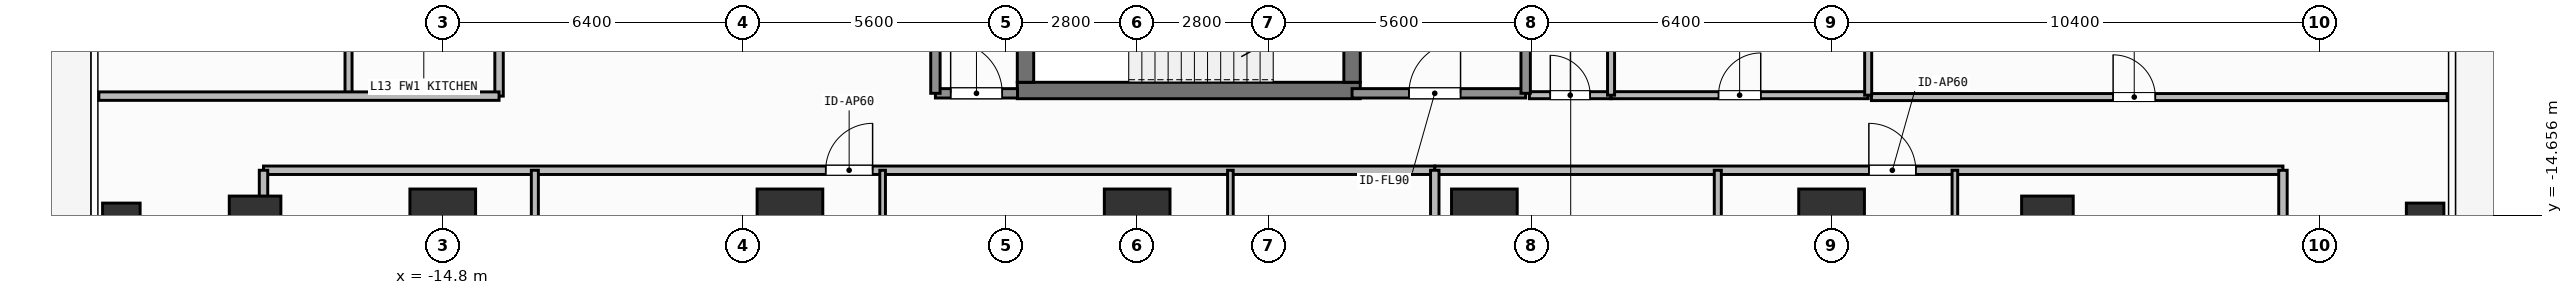
"""IFC4 building model, lengths in metres.
Left out: names, types, materials, properties, quantities, classifications, styles, units other than length and angle.
Written with IfcOpenShell. Run it as: python <this file> out.ifc"""

import sys

from ifc_helpers import new_model, si_unit, direction, frame, frame_2d, origin, origin_2d, place, context, subcontext, project, spatial, rectangle, hollow_rectangle, extrude, element, fill, save


model = new_model("IFC4")
c1 = context("Model", 3, precision=1e-05, world=origin(), true_north=direction((0.0, 1.0)))
c2 = subcontext(c1, "Body", "Model", "MODEL_VIEW")
j1 = project(units=[si_unit("LENGTHUNIT", "METRE"), si_unit("PLANEANGLEUNIT", "RADIAN")], contexts=[c1])
p1 = place(None, origin())
s1 = spatial("IfcSite", under=j1, at=p1, CompositionType="ELEMENT")
p2 = place(p1, origin())
s2 = spatial("IfcBuilding", under=s1, at=p2, CompositionType="ELEMENT")
p3 = place(p2, frame((0.0, 0.0, 50.1)))
s3 = spatial("IfcBuildingStorey", under=s2, at=p3, CompositionType="ELEMENT", Elevation=50.1)
p4 = place(p3, frame((-2.555, -12.0, 0.0), z_axis=(0.0, 0.0, 1.0), x_axis=(1.0, 0.0, 0.0)))
e1 = element("IfcWall", 1, at=p4, inside=s3, PredefinedType="SHEAR", context=c2, shape_type="SweptSolid", body=[
    extrude(rectangle(XDim=7.31, YDim=0.35, at=frame_2d((3.655, 0.0))), origin(), (0.0, 0.0, 1.0), 3.9),
])
p5 = place(p3, frame((-2.38, -11.825, 0.0), z_axis=(0.0, 0.0, 1.0), x_axis=(0.0, 1.0, 0.0)))
e2 = element("IfcWall", 2, at=p5, inside=s3, PredefinedType="SHEAR", context=c2, shape_type="SweptSolid", body=[
    extrude(rectangle(XDim=2.925, YDim=0.35, at=frame_2d((1.462, 0.0))), origin(), (0.0, 0.0, 1.0), 3.9),
])
p6 = place(p3, frame((4.58, -8.9, 0.0), z_axis=(0.0, 0.0, 1.0), x_axis=(0.0, -1.0, 0.0)))
e3 = element("IfcWall", 3, at=p6, inside=s3, PredefinedType="SHEAR", context=c2, shape_type="SweptSolid", body=[
    extrude(rectangle(XDim=2.925, YDim=0.35, at=frame_2d((1.462, 0.0))), origin(), (0.0, 0.0, 1.0), 3.9),
])
p7 = place(p6, frame((0.913, 0.0, 0.0)))
e4 = element("IfcOpeningElement", 4, at=p7, cuts=e3, PredefinedType="OPENING", context=c2, shape_type="SweptSolid", body=[
    extrude(rectangle(XDim=1.1, YDim=2.15, at=frame_2d((0.55, 1.075))), frame((0.0, 0.185, 0.0), z_axis=(0.0, -1.0, 0.0), x_axis=(1.0, 0.0, 0.0)), (0.0, 0.0, 1.0), 0.37),
])
for number, where, z_axis, x_axis in (
    (5, (-14.8, -14.8, 0.0), (0.0, 0.0, 1.0), (1.0, 0.0, 0.0)),
    (6, (-7.4, -14.8, 0.0), (0.0, 0.0, 1.0), (1.0, 0.0, 0.0)),
    (7, (0.0, -14.8, 0.0), (0.0, 0.0, 1.0), (1.0, 0.0, 0.0)),
    (8, (7.4, -14.8, 0.0), (0.0, 0.0, 1.0), (1.0, 0.0, 0.0)),
    (9, (14.8, -14.8, 0.0), (0.0, 0.0, 1.0), (1.0, 0.0, 0.0)),
):
    element("IfcColumn", number, at=place(p3, frame(where, z_axis=z_axis, x_axis=x_axis)), inside=s3, PredefinedType="COLUMN", context=c2, shape_type="SweptSolid", body=[
        extrude(rectangle(XDim=1.4, YDim=1.4, at=origin_2d()), origin(), (0.0, 0.0, 1.0), 3.9),
    ])
for number, where, z_axis, x_axis in (
    (10, (-18.8, -14.8, 0.0), (0.0, 0.0, 1.0), (1.0, 0.0, 0.0)),
    (11, (19.4, -14.8, 0.0), (0.0, 0.0, 1.0), (1.0, 0.0, 0.0)),
):
    element("IfcColumn", number, at=place(p3, frame(where, z_axis=z_axis, x_axis=x_axis)), inside=s3, PredefinedType="COLUMN", context=c2, shape_type="SweptSolid", body=[
        extrude(rectangle(XDim=1.1, YDim=1.1, at=origin_2d()), origin(), (0.0, 0.0, 1.0), 3.9),
    ])
for number, where, z_axis, x_axis in (
    (12, (-21.65, -14.8, 0.0), (0.0, 0.0, 1.0), (1.0, 0.0, 0.0)),
    (13, (27.45, -14.8, 0.0), (0.0, 0.0, 1.0), (1.0, 0.0, 0.0)),
):
    element("IfcColumn", number, at=place(p3, frame(where, z_axis=z_axis, x_axis=x_axis)), inside=s3, PredefinedType="COLUMN", context=c2, shape_type="SweptSolid", body=[
        extrude(hollow_rectangle(XDim=0.8, YDim=0.8, WallThickness=0.036, at=origin_2d()), origin(), (0.0, 0.0, 1.0), 3.9),
    ])
p8 = place(p3, frame((4.58, -12.06, 0.0), z_axis=(0.0, 0.0, 1.0), x_axis=(1.0, 0.0, 0.0)))
e14 = element("IfcWall", 14, at=p8, inside=s3, PredefinedType="SOLIDWALL", context=c2, shape_type="SweptSolid", body=[
    extrude(rectangle(XDim=3.7, YDim=0.2, at=frame_2d((1.85, 0.0))), origin(), (0.0, 0.0, 1.0), 3.62),
])
p9 = place(p8, frame((1.212, 0.0, 0.0)))
e15 = element("IfcOpeningElement", 15, at=p9, cuts=e14, PredefinedType="OPENING", context=c2, shape_type="SweptSolid", body=[
    extrude(rectangle(XDim=1.1, YDim=2.15, at=frame_2d((0.55, 1.075))), frame((0.0, 0.11, 0.0), z_axis=(0.0, -1.0, 0.0), x_axis=(1.0, 0.0, 0.0)), (0.0, 0.0, 1.0), 0.22),
])
p10 = place(p3, frame((-4.3, -12.06, 0.0), z_axis=(0.0, 0.0, 1.0), x_axis=(1.0, 0.0, 0.0)))
e16 = element("IfcWall", 16, at=p10, inside=s3, PredefinedType="SOLIDWALL", context=c2, shape_type="SweptSolid", body=[
    extrude(rectangle(XDim=1.75, YDim=0.2, at=frame_2d((0.875, 0.0))), origin(), (0.0, 0.0, 1.0), 3.62),
])
p11 = place(p10, frame((0.325, 0.0, 0.0)))
e17 = element("IfcOpeningElement", 17, at=p11, cuts=e16, PredefinedType="OPENING", context=c2, shape_type="SweptSolid", body=[
    extrude(rectangle(XDim=1.1, YDim=2.15, at=frame_2d((0.55, 1.075))), frame((0.0, 0.11, 0.0), z_axis=(0.0, -1.0, 0.0), x_axis=(1.0, 0.0, 0.0)), (0.0, 0.0, 1.0), 0.22),
])
p12 = place(p3, frame((8.36, -12.1, 0.0), z_axis=(0.0, 0.0, 1.0), x_axis=(1.0, 0.0, 0.0)))
e18 = element("IfcWall", 18, at=p12, inside=s3, PredefinedType="PARTITIONING", context=c2, shape_type="SweptSolid", body=[
    extrude(rectangle(XDim=1.74, YDim=0.15, at=frame_2d((0.87, 0.0))), origin(), (0.0, 0.0, 1.0), 3.62),
])
p13 = place(p12, frame((0.445, 0.0, 0.0)))
e19 = element("IfcOpeningElement", 19, at=p13, cuts=e18, PredefinedType="OPENING", context=c2, shape_type="SweptSolid", body=[
    extrude(rectangle(XDim=0.85, YDim=2.1, at=frame_2d((0.425, 1.05))), frame((0.0, 0.085, 0.0), z_axis=(0.0, -1.0, 0.0), x_axis=(1.0, 0.0, 0.0)), (0.0, 0.0, 1.0), 0.17),
])
p14 = place(p3, frame((10.1, -12.1, 0.0), z_axis=(0.0, 0.0, 1.0), x_axis=(1.0, 0.0, 0.0)))
e20 = element("IfcWall", 20, at=p14, inside=s3, PredefinedType="PARTITIONING", context=c2, shape_type="SweptSolid", body=[
    extrude(rectangle(XDim=5.48, YDim=0.15, at=frame_2d((2.74, 0.0))), origin(), (0.0, 0.0, 1.0), 3.62),
])
p15 = place(p14, frame((2.29, 0.0, 0.0)))
e21 = element("IfcOpeningElement", 21, at=p15, cuts=e20, PredefinedType="OPENING", context=c2, shape_type="SweptSolid", body=[
    extrude(rectangle(XDim=0.9, YDim=2.1, at=frame_2d((0.45, 1.05))), frame((0.0, 0.085, 0.0), z_axis=(0.0, -1.0, 0.0), x_axis=(1.0, 0.0, 0.0)), (0.0, 0.0, 1.0), 0.17),
])
p16 = place(p3, frame((-18.62, -13.7, 0.0), z_axis=(0.0, 0.0, 1.0), x_axis=(1.0, 0.0, 0.0)))
e22 = element("IfcWall", 22, at=p16, inside=s3, PredefinedType="PARTITIONING", context=c2, shape_type="SweptSolid", body=[
    extrude(rectangle(XDim=24.963, YDim=0.18, at=frame_2d((12.481, 0.0))), origin(), (0.0, 0.0, 1.0), 3.62),
])
p17 = place(p16, frame((11.981, 0.0, 0.0)))
e23 = element("IfcOpeningElement", 23, at=p17, cuts=e22, PredefinedType="OPENING", context=c2, shape_type="SweptSolid", body=[
    extrude(rectangle(XDim=1.0, YDim=2.2, at=frame_2d((0.5, 1.1))), frame((0.0, 0.1, 0.0), z_axis=(0.0, -1.0, 0.0), x_axis=(1.0, 0.0, 0.0)), (0.0, 0.0, 1.0), 0.2),
])
p18 = place(p3, frame((-5.425, -20.79, 0.0), z_axis=(0.0, 0.0, 1.0), x_axis=(0.0, 1.0, 0.0)))
e24 = element("IfcWall", 24, at=p18, inside=s3, PredefinedType="PARTITIONING", context=c2, shape_type="SweptSolid", body=[
    extrude(rectangle(XDim=7.09, YDim=0.12, at=frame_2d((3.545, 0.0))), origin(), (0.0, 0.0, 1.0), 3.62),
])
p19 = place(p18, frame((2.117, 0.0, 0.0)))
e25 = element("IfcOpeningElement", 25, at=p19, cuts=e24, PredefinedType="OPENING", context=c2, shape_type="SweptSolid", body=[
    extrude(rectangle(XDim=0.9, YDim=2.1, at=frame_2d((0.45, 1.05))), frame((0.0, 0.07, 0.0), z_axis=(0.0, -1.0, 0.0), x_axis=(1.0, 0.0, 0.0)), (0.0, 0.0, 1.0), 0.14),
])
p20 = place(p3, frame((-12.837, -20.79, 0.0), z_axis=(0.0, 0.0, 1.0), x_axis=(0.0, 1.0, 0.0)))
e26 = element("IfcWall", 26, at=p20, inside=s3, PredefinedType="PARTITIONING", context=c2, shape_type="SweptSolid", body=[
    extrude(rectangle(XDim=7.09, YDim=0.15, at=frame_2d((3.545, 0.0))), origin(), (0.0, 0.0, 1.0), 3.62),
])
p21 = place(p20, frame((2.133, 0.0, 0.0)))
e27 = element("IfcOpeningElement", 27, at=p21, cuts=e26, PredefinedType="OPENING", context=c2, shape_type="SweptSolid", body=[
    extrude(rectangle(XDim=0.85, YDim=2.1, at=frame_2d((0.425, 1.05))), frame((0.0, 0.085, 0.0), z_axis=(0.0, -1.0, 0.0), x_axis=(1.0, 0.0, 0.0)), (0.0, 0.0, 1.0), 0.17),
])
p22 = place(p3, frame((1.987, -18.663, 0.0), z_axis=(0.0, 0.0, 1.0), x_axis=(0.0, 1.0, 0.0)))
e28 = element("IfcWall", 28, at=p22, inside=s3, PredefinedType="PARTITIONING", context=c2, shape_type="SweptSolid", body=[
    extrude(rectangle(XDim=4.963, YDim=0.12, at=frame_2d((2.481, 0.0))), origin(), (0.0, 0.0, 1.0), 3.62),
])
p23 = place(p22, frame((2.056, 0.0, 0.0)))
e29 = element("IfcOpeningElement", 29, at=p23, cuts=e28, PredefinedType="OPENING", context=c2, shape_type="SweptSolid", body=[
    extrude(rectangle(XDim=0.85, YDim=2.1, at=frame_2d((0.425, 1.05))), frame((0.0, 0.07, 0.0), z_axis=(0.0, -1.0, 0.0), x_axis=(1.0, 0.0, 0.0)), (0.0, 0.0, 1.0), 0.14),
])
p24 = place(p3, frame((6.343, -13.7, 0.0), z_axis=(0.0, 0.0, 1.0), x_axis=(1.0, 0.0, 0.0)))
e30 = element("IfcWall", 30, at=p24, inside=s3, PredefinedType="PARTITIONING", context=c2, shape_type="SweptSolid", body=[
    extrude(rectangle(XDim=18.077, YDim=0.18, at=frame_2d((9.039, 0.0))), origin(), (0.0, 0.0, 1.0), 3.62),
])
p25 = place(p24, frame((9.252, 0.0, 0.0)))
e31 = element("IfcOpeningElement", 31, at=p25, cuts=e30, PredefinedType="OPENING", context=c2, shape_type="SweptSolid", body=[
    extrude(rectangle(XDim=1.0, YDim=2.2, at=frame_2d((0.5, 1.1))), frame((0.0, 0.1, 0.0), z_axis=(0.0, -1.0, 0.0), x_axis=(1.0, 0.0, 0.0)), (0.0, 0.0, 1.0), 0.2),
])
p26 = place(p3, frame((12.375, -20.79, 0.0), z_axis=(0.0, 0.0, 1.0), x_axis=(0.0, 1.0, 0.0)))
e32 = element("IfcWall", 32, at=p26, inside=s3, PredefinedType="PARTITIONING", context=c2, shape_type="SweptSolid", body=[
    extrude(rectangle(XDim=7.09, YDim=0.15, at=frame_2d((3.545, 0.0))), origin(), (0.0, 0.0, 1.0), 3.62),
])
p27 = place(p26, frame((3.03, 0.0, 0.0)))
e33 = element("IfcOpeningElement", 33, at=p27, cuts=e32, PredefinedType="OPENING", context=c2, shape_type="SweptSolid", body=[
    extrude(rectangle(XDim=0.85, YDim=2.1, at=frame_2d((0.425, 1.05))), frame((0.0, 0.085, 0.0), z_axis=(0.0, -1.0, 0.0), x_axis=(1.0, 0.0, 0.0)), (0.0, 0.0, 1.0), 0.17),
])
p28 = place(p3, frame((17.428, -17.883, 0.0), z_axis=(0.0, 0.0, 1.0), x_axis=(0.0, 1.0, 0.0)))
e34 = element("IfcWall", 34, at=p28, inside=s3, PredefinedType="PARTITIONING", context=c2, shape_type="SweptSolid", body=[
    extrude(rectangle(XDim=4.183, YDim=0.12, at=frame_2d((2.092, 0.0))), origin(), (0.0, 0.0, 1.0), 3.62),
])
p29 = place(p28, frame((1.578, 0.0, 0.0)))
e35 = element("IfcOpeningElement", 35, at=p29, cuts=e34, PredefinedType="OPENING", context=c2, shape_type="SweptSolid", body=[
    extrude(rectangle(XDim=0.85, YDim=2.1, at=frame_2d((0.425, 1.05))), frame((0.0, 0.07, 0.0), z_axis=(0.0, -1.0, 0.0), x_axis=(1.0, 0.0, 0.0)), (0.0, 0.0, 1.0), 0.14),
])
p30 = place(p3, frame((-13.6, -12.12, 0.0), z_axis=(0.0, 0.0, 1.0), x_axis=(0.0, 1.0, 0.0)))
e36 = element("IfcWall", 36, at=p30, inside=s3, PredefinedType="PARTITIONING", context=c2, shape_type="SweptSolid", body=[
    extrude(rectangle(XDim=24.24, YDim=0.18, at=frame_2d((12.12, 0.0))), origin(), (0.0, 0.0, 1.0), 3.62),
])
p31 = place(p30, frame((9.829, 0.0, 0.0)))
e37 = element("IfcOpeningElement", 37, at=p31, cuts=e36, PredefinedType="OPENING", context=c2, shape_type="SweptSolid", body=[
    extrude(rectangle(XDim=1.0, YDim=2.2, at=frame_2d((0.5, 1.1))), frame((0.0, 0.1, 0.0), z_axis=(0.0, -1.0, 0.0), x_axis=(1.0, 0.0, 0.0)), (0.0, 0.0, 1.0), 0.2),
])
p32 = place(p3, frame((15.65, -12.14, 0.0), z_axis=(0.0, 0.0, 1.0), x_axis=(1.0, 0.0, 0.0)))
e38 = element("IfcWall", 38, at=p32, inside=s3, PredefinedType="PARTITIONING", context=c2, shape_type="SweptSolid", body=[
    extrude(rectangle(XDim=12.27, YDim=0.15, at=frame_2d((6.135, 0.0))), origin(), (0.0, 0.0, 1.0), 3.62),
])
p33 = place(p32, frame((5.15, 0.0, 0.0)))
e39 = element("IfcOpeningElement", 39, at=p33, cuts=e38, PredefinedType="OPENING", context=c2, shape_type="SweptSolid", body=[
    extrude(rectangle(XDim=0.9, YDim=2.1, at=frame_2d((0.45, 1.05))), frame((0.0, 0.085, 0.0), z_axis=(0.0, -1.0, 0.0), x_axis=(1.0, 0.0, 0.0)), (0.0, 0.0, 1.0), 0.17),
])
for number, where, z_axis, x_axis in (
    (40, (8.28, -12.06, 0.0), (0.0, 0.0, 1.0), (0.0, 1.0, 0.0)),
    (41, (-4.3, -12.06, 0.0), (0.0, 0.0, 1.0), (0.0, 1.0, 0.0)),
):
    element("IfcWall", number, at=place(p3, frame(where, z_axis=z_axis, x_axis=x_axis)), inside=s3, PredefinedType="SOLIDWALL", context=c2, shape_type="SweptSolid", body=[
        extrude(rectangle(XDim=3.11, YDim=0.2, at=frame_2d((1.555, 0.0))), origin(), (0.0, 0.0, 1.0), 3.62),
    ])
p34 = place(p3, frame((10.1, -12.1, 0.0), z_axis=(0.0, 0.0, 1.0), x_axis=(0.0, 1.0, 0.0)))
e42 = element("IfcWall", 42, at=p34, inside=s3, PredefinedType="PARTITIONING", context=c2, shape_type="SweptSolid", body=[
    extrude(rectangle(XDim=2.35, YDim=0.15, at=frame_2d((1.175, 0.0))), origin(), (0.0, 0.0, 1.0), 3.62),
])
p35 = place(p3, frame((15.58, -12.1, 0.0), z_axis=(0.0, 0.0, 1.0), x_axis=(0.0, 1.0, 0.0)))
e43 = element("IfcWall", 43, at=p35, inside=s3, PredefinedType="PARTITIONING", context=c2, shape_type="SweptSolid", body=[
    extrude(rectangle(XDim=6.25, YDim=0.15, at=frame_2d((3.125, 0.0))), origin(), (0.0, 0.0, 1.0), 3.62),
])
p36 = place(p3, frame((-18.62, -23.91, 0.0), z_axis=(0.0, 0.0, 1.0), x_axis=(0.0, 1.0, 0.0)))
e44 = element("IfcWall", 44, at=p36, inside=s3, PredefinedType="PARTITIONING", context=c2, shape_type="SweptSolid", body=[
    extrude(rectangle(XDim=10.21, YDim=0.18, at=frame_2d((5.105, 0.0))), origin(), (0.0, 0.0, 1.0), 2.71),
])
p37 = place(p3, frame((24.42, -23.91, 0.0), z_axis=(0.0, 0.0, 1.0), x_axis=(0.0, 1.0, 0.0)))
e45 = element("IfcWall", 45, at=p37, inside=s3, PredefinedType="PARTITIONING", context=c2, shape_type="SweptSolid", body=[
    extrude(rectangle(XDim=10.21, YDim=0.18, at=frame_2d((5.105, 0.0))), origin(), (0.0, 0.0, 1.0), 3.62),
])
p38 = place(p3, frame((6.343, -25.03, 0.0), z_axis=(0.0, 0.0, 1.0), x_axis=(0.0, 1.0, 0.0)))
e46 = element("IfcWall", 46, at=p38, inside=s3, PredefinedType="PARTITIONING", context=c2, shape_type="SweptSolid", body=[
    extrude(rectangle(XDim=11.33, YDim=0.18, at=frame_2d((5.665, 0.0))), origin(), (0.0, 0.0, 1.0), 3.62),
])
p39 = place(p3, frame((-16.808, -12.12, 0.0), z_axis=(0.0, 0.0, 1.0), x_axis=(0.0, 1.0, 0.0)))
e47 = element("IfcWall", 47, at=p39, inside=s3, PredefinedType="PARTITIONING", context=c2, shape_type="SweptSolid", body=[
    extrude(rectangle(XDim=2.8, YDim=0.15, at=frame_2d((1.4, 0.0))), origin(), (0.0, 0.0, 1.0), 3.62),
])
p40 = place(p3, frame((-22.13, -12.12, 0.0), z_axis=(0.0, 0.0, 1.0), x_axis=(1.0, 0.0, 0.0)))
e48 = element("IfcWall", 48, at=p40, inside=s3, PredefinedType="PARTITIONING", context=c2, shape_type="SweptSolid", body=[
    extrude(rectangle(XDim=8.53, YDim=0.18, at=frame_2d((4.265, 0.0))), origin(), (0.0, 0.0, 1.0), 3.62),
])
p41 = place(p9, origin())
e49 = element("IfcDoor", 49, at=p41, inside=s3, OperationType="SINGLE_SWING_RIGHT", PredefinedType="DOOR", context=c2, shape_type="SweptSolid", body=[
    extrude(rectangle(XDim=1.1, YDim=2.15, at=frame_2d((0.55, 1.075))), frame((0.0, 0.025, 0.0), z_axis=(0.0, -1.0, 0.0), x_axis=(1.0, 0.0, 0.0)), (0.0, 0.0, 1.0), 0.05),
])
fill(e15, e49)
p42 = place(p11, origin())
e50 = element("IfcDoor", 50, at=p42, inside=s3, OperationType="SINGLE_SWING_LEFT", PredefinedType="DOOR", context=c2, shape_type="SweptSolid", body=[
    extrude(rectangle(XDim=1.1, YDim=2.15, at=frame_2d((0.55, 1.075))), frame((0.0, 0.025, 0.0), z_axis=(0.0, -1.0, 0.0), x_axis=(1.0, 0.0, 0.0)), (0.0, 0.0, 1.0), 0.05),
])
fill(e17, e50)
p43 = place(p13, origin())
e51 = element("IfcDoor", 51, at=p43, inside=s3, OperationType="SINGLE_SWING_LEFT", PredefinedType="DOOR", context=c2, shape_type="SweptSolid", body=[
    extrude(rectangle(XDim=0.85, YDim=2.1, at=frame_2d((0.425, 1.05))), frame((0.0, 0.025, 0.0), z_axis=(0.0, -1.0, 0.0), x_axis=(1.0, 0.0, 0.0)), (0.0, 0.0, 1.0), 0.05),
])
fill(e19, e51)
p44 = place(p15, origin())
e52 = element("IfcDoor", 52, at=p44, inside=s3, OperationType="SINGLE_SWING_RIGHT", PredefinedType="DOOR", context=c2, shape_type="SweptSolid", body=[
    extrude(rectangle(XDim=0.9, YDim=2.1, at=frame_2d((0.45, 1.05))), frame((0.0, 0.025, 0.0), z_axis=(0.0, -1.0, 0.0), x_axis=(1.0, 0.0, 0.0)), (0.0, 0.0, 1.0), 0.05),
])
fill(e21, e52)
p45 = place(p17, origin())
e53 = element("IfcDoor", 53, at=p45, inside=s3, OperationType="SINGLE_SWING_RIGHT", PredefinedType="DOOR", context=c2, shape_type="SweptSolid", body=[
    extrude(rectangle(XDim=1.0, YDim=2.2, at=frame_2d((0.5, 1.1))), frame((0.0, 0.025, 0.0), z_axis=(0.0, -1.0, 0.0), x_axis=(1.0, 0.0, 0.0)), (0.0, 0.0, 1.0), 0.05),
])
fill(e23, e53)
p46 = place(p25, origin())
e54 = element("IfcDoor", 54, at=p46, inside=s3, OperationType="SINGLE_SWING_LEFT", PredefinedType="DOOR", context=c2, shape_type="SweptSolid", body=[
    extrude(rectangle(XDim=1.0, YDim=2.2, at=frame_2d((0.5, 1.1))), frame((0.0, 0.025, 0.0), z_axis=(0.0, -1.0, 0.0), x_axis=(1.0, 0.0, 0.0)), (0.0, 0.0, 1.0), 0.05),
])
fill(e31, e54)
p47 = place(p33, origin())
e55 = element("IfcDoor", 55, at=p47, inside=s3, OperationType="SINGLE_SWING_LEFT", PredefinedType="DOOR", context=c2, shape_type="SweptSolid", body=[
    extrude(rectangle(XDim=0.9, YDim=2.1, at=frame_2d((0.45, 1.05))), frame((0.0, 0.025, 0.0), z_axis=(0.0, -1.0, 0.0), x_axis=(1.0, 0.0, 0.0)), (0.0, 0.0, 1.0), 0.05),
])
fill(e39, e55)
save(model, sys.argv[1])
